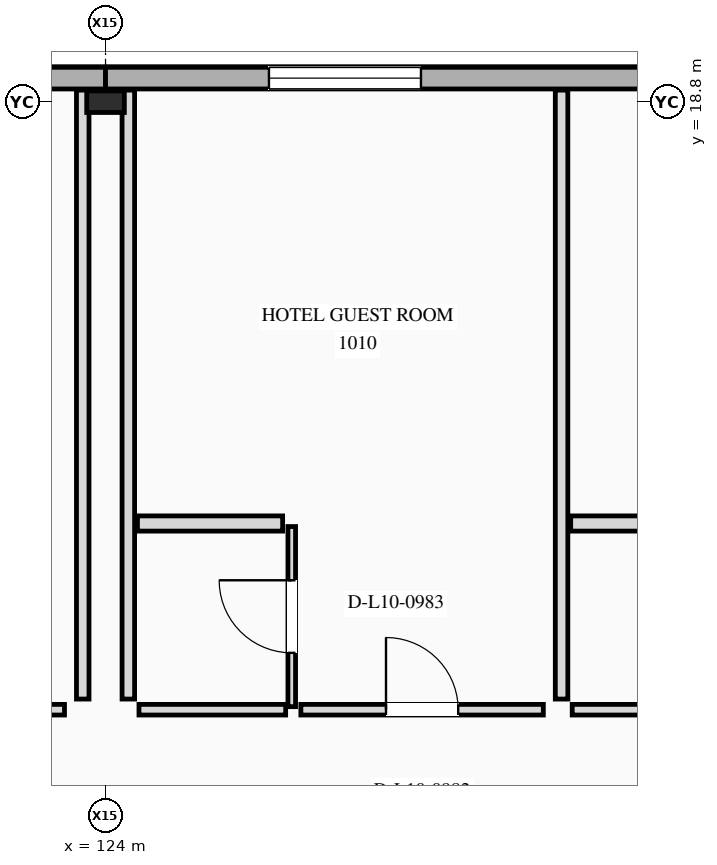
"""IFC4 building model, lengths in metres.
Left out: names, types, materials, properties, quantities, classifications, styles, units other than length and angle.
Written with IfcOpenShell. Run it as: python <this file> out.ifc"""

import sys

from ifc_helpers import new_model, si_unit, direction, frame, frame_2d, origin, origin_2d, place, context, subcontext, project, spatial, rectangle, i_section, extrude, element, fill, save


model = new_model("IFC4")
c1 = context("Model", 3, precision=1e-05, world=origin(), true_north=direction((0.0, 1.0)))
c2 = subcontext(c1, "Body", "Model", "MODEL_VIEW")
j1 = project(units=[si_unit("LENGTHUNIT", "METRE"), si_unit("PLANEANGLEUNIT", "RADIAN")], contexts=[c1])
p1 = place(None, origin())
s1 = spatial("IfcSite", under=j1, at=p1, CompositionType="ELEMENT")
p2 = place(p1, origin())
s2 = spatial("IfcBuilding", under=s1, at=p2, CompositionType="ELEMENT")
p3 = place(p2, frame((0.0, 0.0, 41.1)))
s3 = spatial("IfcBuildingStorey", under=s2, at=p3, CompositionType="ELEMENT", Elevation=41.1)
p4 = place(p3, frame((124.0, 18.8, 0.0), z_axis=(0.0, 0.0, 1.0), x_axis=(0.0, 1.0, 0.0)))
e1 = element("IfcColumn", 1, at=p4, inside=s3, PredefinedType="COLUMN", context=c2, shape_type="SweptSolid", body=[
    extrude(i_section(OverallWidth=0.284, OverallDepth=0.495, WebThickness=0.019, FlangeThickness=0.033, at=origin_2d()), origin(), (0.0, 0.0, 1.0), 3.5),
])
p5 = place(p3, frame((124.0, 19.11, 0.0), z_axis=(0.0, 0.0, 1.0), x_axis=(-1.0, 0.0, 0.0)))
e2 = element("IfcWall", 2, at=p5, inside=s3, PredefinedType="STANDARD", context=c2, shape_type="SweptSolid", body=[
    extrude(rectangle(XDim=12.0, YDim=0.285, at=frame_2d((6.0, 0.0))), origin(), (0.0, 0.0, 1.0), 3.5),
])
p6 = place(p5, frame((5.0, 0.0, 0.85)))
e3 = element("IfcOpeningElement", 3, at=p6, cuts=e2, PredefinedType="OPENING", context=c2, shape_type="SweptSolid", body=[
    extrude(rectangle(XDim=2.0, YDim=1.65, at=frame_2d((1.0, 0.825))), frame((0.0, 0.152, 0.0), z_axis=(0.0, -1.0, 0.0), x_axis=(1.0, 0.0, 0.0)), (0.0, 0.0, 1.0), 0.305),
])
p7 = place(p3, frame((136.0, 19.11, 0.0), z_axis=(0.0, 0.0, 1.0), x_axis=(-1.0, 0.0, 0.0)))
e4 = element("IfcWall", 4, at=p7, inside=s3, PredefinedType="STANDARD", context=c2, shape_type="SweptSolid", body=[
    extrude(rectangle(XDim=12.0, YDim=0.285, at=frame_2d((6.0, 0.0))), origin(), (0.0, 0.0, 1.0), 3.5),
])
p8 = place(p7, frame((7.85, 0.0, 0.85)))
e5 = element("IfcOpeningElement", 5, at=p8, cuts=e4, PredefinedType="OPENING", context=c2, shape_type="SweptSolid", body=[
    extrude(rectangle(XDim=2.0, YDim=1.65, at=frame_2d((1.0, 0.825))), frame((0.0, 0.152, 0.0), z_axis=(0.0, -1.0, 0.0), x_axis=(1.0, 0.0, 0.0)), (0.0, 0.0, 1.0), 0.305),
])
p9 = place(p7, frame((2.15, 0.0, 0.85)))
e6 = element("IfcOpeningElement", 6, at=p9, cuts=e4, PredefinedType="OPENING", context=c2, shape_type="SweptSolid", body=[
    extrude(rectangle(XDim=2.0, YDim=1.65, at=frame_2d((1.0, 0.825))), frame((0.0, 0.152, 0.0), z_axis=(0.0, -1.0, 0.0), x_axis=(1.0, 0.0, 0.0)), (0.0, 0.0, 1.0), 0.305),
])
p10 = place(p3, frame((124.44, 10.8, 0.0), z_axis=(0.0, 0.0, 1.0), x_axis=(1.0, 0.0, 0.0)))
e7 = element("IfcWall", 7, at=p10, inside=s3, PredefinedType="PARTITIONING", context=c2, shape_type="SweptSolid", body=[
    extrude(rectangle(XDim=1.93, YDim=0.14, at=frame_2d((0.965, 0.0))), origin(), (0.0, 0.0, 1.0), 3.18),
])
p11 = place(p3, frame((126.57, 10.8, 0.0), z_axis=(0.0, 0.0, 1.0), x_axis=(1.0, 0.0, 0.0)))
e8 = element("IfcWall", 8, at=p11, inside=s3, PredefinedType="PARTITIONING", context=c2, shape_type="SweptSolid", body=[
    extrude(rectangle(XDim=3.19, YDim=0.14, at=frame_2d((1.595, 0.0))), origin(), (0.0, 0.0, 1.0), 3.18),
])
p12 = place(p11, frame((1.12, 0.0, 0.0)))
e9 = element("IfcOpeningElement", 9, at=p12, cuts=e8, PredefinedType="OPENING", context=c2, shape_type="SweptSolid", body=[
    extrude(rectangle(XDim=0.95, YDim=2.3, at=frame_2d((0.475, 1.15))), frame((0.0, 0.08, 0.0), z_axis=(0.0, -1.0, 0.0), x_axis=(1.0, 0.0, 0.0)), (0.0, 0.0, 1.0), 0.16),
])
p13 = place(p3, frame((124.3, 10.94, 0.0), z_axis=(0.0, 0.0, 1.0), x_axis=(0.0, 1.0, 0.0)))
e10 = element("IfcWall", 10, at=p13, inside=s3, PredefinedType="PARTITIONING", context=c2, shape_type="SweptSolid", body=[
    extrude(rectangle(XDim=8.012, YDim=0.165, at=frame_2d((4.006, 0.0))), origin(), (0.0, 0.0, 1.0), 2.509),
])
p14 = place(p3, frame((130.0, 10.94, 0.0), z_axis=(0.0, 0.0, 1.0), x_axis=(0.0, 1.0, 0.0)))
e11 = element("IfcWall", 11, at=p14, inside=s3, PredefinedType="PARTITIONING", context=c2, shape_type="SweptSolid", body=[
    extrude(rectangle(XDim=8.012, YDim=0.165, at=frame_2d((4.006, 0.0))), origin(), (0.0, 0.0, 1.0), 3.18),
])
p15 = place(p3, frame((126.45, 10.84, 0.0), z_axis=(0.0, 0.0, 1.0), x_axis=(0.0, 1.0, 0.0)))
e12 = element("IfcWall", 12, at=p15, inside=s3, PredefinedType="PARTITIONING", context=c2, shape_type="SweptSolid", body=[
    extrude(rectangle(XDim=2.37, YDim=0.1, at=frame_2d((1.185, 0.0))), origin(), (0.0, 0.0, 1.0), 3.18),
])
p16 = place(p15, frame((0.708, 0.0, 0.0)))
e13 = element("IfcOpeningElement", 13, at=p16, cuts=e12, PredefinedType="OPENING", context=c2, shape_type="SweptSolid", body=[
    extrude(rectangle(XDim=0.955, YDim=2.14, at=frame_2d((0.478, 1.07))), frame((0.0, 0.06, 0.0), z_axis=(0.0, -1.0, 0.0), x_axis=(1.0, 0.0, 0.0)), (0.0, 0.0, 1.0), 0.12),
])
p17 = place(p3, frame((124.42, 13.25, 0.0), z_axis=(0.0, 0.0, 1.0), x_axis=(1.0, 0.0, 0.0)))
e14 = element("IfcWall", 14, at=p17, inside=s3, PredefinedType="PLUMBINGWALL", context=c2, shape_type="SweptSolid", body=[
    extrude(rectangle(XDim=1.91, YDim=0.2, at=frame_2d((0.955, 0.0))), origin(), (0.0, 0.0, 1.0), 3.18),
])
p18 = place(p3, frame((130.14, 10.8, 0.0), z_axis=(0.0, 0.0, 1.0), x_axis=(1.0, 0.0, 0.0)))
e15 = element("IfcWall", 15, at=p18, inside=s3, PredefinedType="PARTITIONING", context=c2, shape_type="SweptSolid", body=[
    extrude(rectangle(XDim=1.93, YDim=0.14, at=frame_2d((0.965, 0.0))), origin(), (0.0, 0.0, 1.0), 3.18),
])
p19 = place(p3, frame((130.12, 13.25, 0.0), z_axis=(0.0, 0.0, 1.0), x_axis=(1.0, 0.0, 0.0)))
e16 = element("IfcWall", 16, at=p19, inside=s3, PredefinedType="PLUMBINGWALL", context=c2, shape_type="SweptSolid", body=[
    extrude(rectangle(XDim=1.91, YDim=0.2, at=frame_2d((0.955, 0.0))), origin(), (0.0, 0.0, 1.0), 3.18),
])
p20 = place(p3, frame((112.54, 10.8, 0.0), z_axis=(0.0, 0.0, 1.0), x_axis=(1.0, 0.0, 0.0)))
e17 = element("IfcWall", 17, at=p20, inside=s3, PredefinedType="PARTITIONING", context=c2, shape_type="SweptSolid", body=[
    extrude(rectangle(XDim=10.92, YDim=0.14, at=frame_2d((5.46, 0.0))), origin(), (0.0, 0.0, 1.0), 3.18),
])
p21 = place(p20, frame((4.925, 0.0, 0.0)))
e18 = element("IfcOpeningElement", 18, at=p21, cuts=e17, PredefinedType="OPENING", context=c2, shape_type="SweptSolid", body=[
    extrude(rectangle(XDim=1.07, YDim=2.4, at=frame_2d((0.535, 1.2))), frame((0.0, 0.08, 0.0), z_axis=(0.0, -1.0, 0.0), x_axis=(1.0, 0.0, 0.0)), (0.0, 0.0, 1.0), 0.16),
])
p22 = place(p3, frame((123.7, 10.94, 0.0), z_axis=(0.0, 0.0, 1.0), x_axis=(0.0, 1.0, 0.0)))
e19 = element("IfcWall", 19, at=p22, inside=s3, PredefinedType="PARTITIONING", context=c2, shape_type="SweptSolid", body=[
    extrude(rectangle(XDim=8.012, YDim=0.165, at=frame_2d((4.006, 0.0))), origin(), (0.0, 0.0, 1.0), 2.418),
])
p23 = place(p8, origin())
e20 = element("IfcWindow", 20, at=p23, inside=s3, PartitioningType="SINGLE_PANEL", PredefinedType="WINDOW", context=c2, shape_type="SweptSolid", body=[
    extrude(rectangle(XDim=2.0, YDim=1.65, at=frame_2d((1.0, 0.825))), frame((0.0, 0.03, 0.0), z_axis=(0.0, -1.0, 0.0), x_axis=(1.0, 0.0, 0.0)), (0.0, 0.0, 1.0), 0.06),
])
fill(e5, e20)
p24 = place(p12, origin())
e21 = element("IfcDoor", 21, at=p24, inside=s3, OperationType="SINGLE_SWING_LEFT", PredefinedType="DOOR", context=c2, shape_type="SweptSolid", body=[
    extrude(rectangle(XDim=0.95, YDim=2.3, at=frame_2d((0.475, 1.15))), frame((0.0, 0.025, 0.0), z_axis=(0.0, -1.0, 0.0), x_axis=(1.0, 0.0, 0.0)), (0.0, 0.0, 1.0), 0.05),
])
fill(e9, e21)
p25 = place(p16, origin())
e22 = element("IfcDoor", 22, at=p25, inside=s3, OperationType="SINGLE_SWING_RIGHT", PredefinedType="DOOR", context=c2, shape_type="SweptSolid", body=[
    extrude(rectangle(XDim=0.955, YDim=2.14, at=frame_2d((0.478, 1.07))), frame((0.0, 0.025, 0.0), z_axis=(0.0, -1.0, 0.0), x_axis=(1.0, 0.0, 0.0)), (0.0, 0.0, 1.0), 0.05),
])
fill(e13, e22)
save(model, sys.argv[1])
